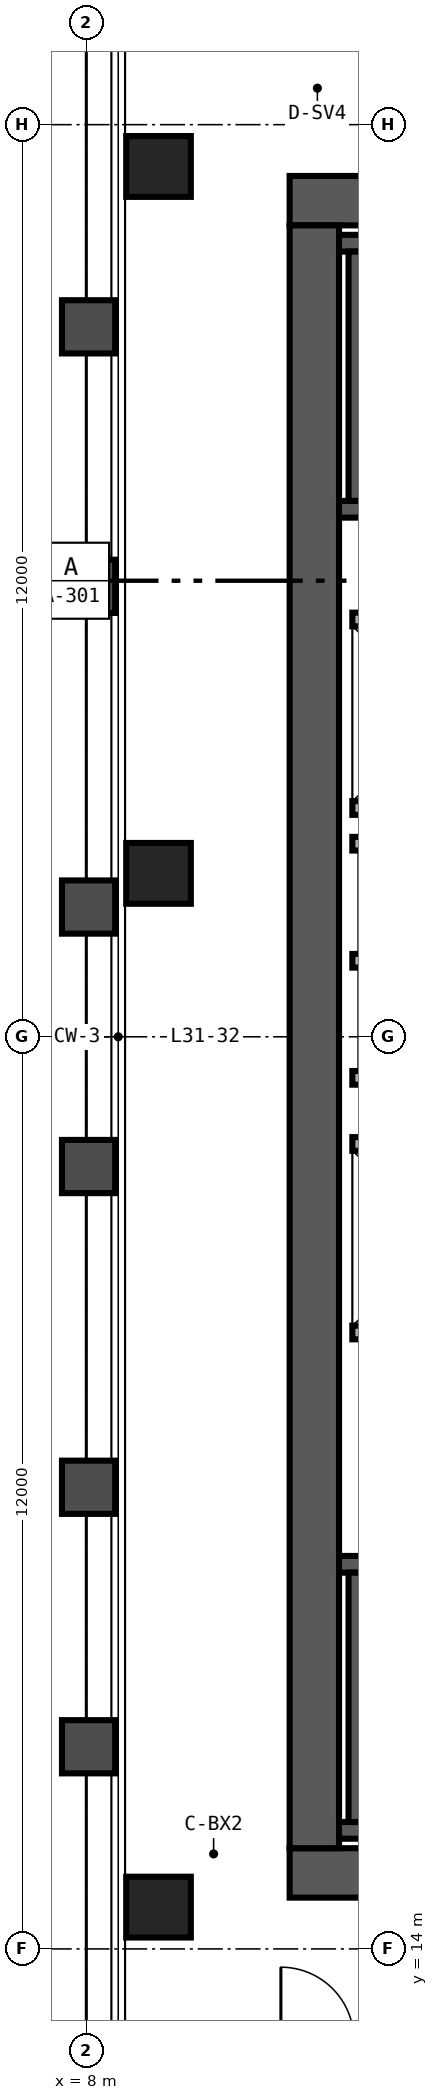
"""IFC4 building model, lengths in metres.
Left out: names, types, materials, properties, quantities, classifications, styles, units other than length and angle.
Written with IfcOpenShell. Run it as: python <this file> out.ifc"""

import sys

from ifc_helpers import new_model, si_unit, direction, frame, frame_2d, origin, origin_2d, place, context, subcontext, project, spatial, rectangle, hollow_rectangle, extrude, source, transform, mapped, element, save


model = new_model("IFC4")
c1 = context("Model", 3, precision=1e-05, world=origin(), true_north=direction((0.0, 1.0)))
c2 = subcontext(c1, "Body", "Model", "MODEL_VIEW")
j1 = project(units=[si_unit("LENGTHUNIT", "METRE"), si_unit("PLANEANGLEUNIT", "RADIAN")], contexts=[c1])
p1 = place(None, origin())
s1 = spatial("IfcSite", under=j1, at=p1, CompositionType="ELEMENT")
p2 = place(p1, origin())
s2 = spatial("IfcBuilding", under=s1, at=p2, CompositionType="ELEMENT")
p3 = place(p2, frame((0.0, 0.0, 126.0)))
s3 = spatial("IfcBuildingStorey", under=s2, at=p3, CompositionType="ELEMENT", Elevation=126.0)
p4 = place(p3, frame((10.675, 15.0, 0.0), z_axis=(0.0, 0.0, 1.0), x_axis=(1.0, 0.0, 0.0)))
e1 = element("IfcWall", 1, at=p4, inside=s3, PredefinedType="SHEAR", context=c2, shape_type="SweptSolid", body=[
    extrude(rectangle(XDim=12.65, YDim=0.65, at=frame_2d((6.325, 0.0))), origin(), (0.0, 0.0, 1.0), 3.36),
])
p5 = place(p4, frame((10.225, 0.0, 0.0)))
e2 = element("IfcOpeningElement", 2, at=p5, cuts=e1, PredefinedType="OPENING", context=c2, shape_type="SweptSolid", body=[
    extrude(rectangle(XDim=1.0, YDim=2.15, at=frame_2d((0.5, 1.075))), frame((0.0, 0.335, 0.0), z_axis=(0.0, -1.0, 0.0), x_axis=(1.0, 0.0, 0.0)), (0.0, 0.0, 1.0), 0.67),
])
p6 = place(p3, frame((10.675, 37.0, 0.0), z_axis=(0.0, 0.0, 1.0), x_axis=(1.0, 0.0, 0.0)))
e3 = element("IfcWall", 3, at=p6, inside=s3, PredefinedType="SHEAR", context=c2, shape_type="SweptSolid", body=[
    extrude(rectangle(XDim=12.65, YDim=0.65, at=frame_2d((6.325, 0.0))), origin(), (0.0, 0.0, 1.0), 3.36),
])
p7 = place(p6, frame((10.425, 0.0, 0.0)))
e4 = element("IfcOpeningElement", 4, at=p7, cuts=e3, PredefinedType="OPENING", context=c2, shape_type="SweptSolid", body=[
    extrude(rectangle(XDim=1.0, YDim=2.15, at=frame_2d((0.5, 1.075))), frame((0.0, 0.335, 0.0), z_axis=(0.0, -1.0, 0.0), x_axis=(1.0, 0.0, 0.0)), (0.0, 0.0, 1.0), 0.67),
])
p8 = place(p3, frame((11.0, 15.325, 0.0), z_axis=(0.0, 0.0, 1.0), x_axis=(0.0, 1.0, 0.0)))
e5 = element("IfcWall", 5, at=p8, inside=s3, PredefinedType="SHEAR", context=c2, shape_type="SweptSolid", body=[
    extrude(rectangle(XDim=21.35, YDim=0.65, at=frame_2d((10.675, 0.0))), origin(), (0.0, 0.0, 1.0), 3.36),
])
p9 = place(p3, frame((11.325, 15.56, 0.0), z_axis=(0.0, 0.0, 1.0), x_axis=(1.0, 0.0, 0.0)))
e6 = element("IfcWall", 6, at=p9, inside=s3, PredefinedType="SHEAR", context=c2, shape_type="SweptSolid", body=[
    extrude(rectangle(XDim=7.985, YDim=0.22, at=frame_2d((3.993, 0.0))), origin(), (0.0, 0.0, 1.0), 3.4),
])
p10 = place(p3, frame((11.325, 19.06, 0.0), z_axis=(0.0, 0.0, 1.0), x_axis=(1.0, 0.0, 0.0)))
e7 = element("IfcWall", 7, at=p10, inside=s3, PredefinedType="SHEAR", context=c2, shape_type="SweptSolid", body=[
    extrude(rectangle(XDim=7.985, YDim=0.22, at=frame_2d((3.993, 0.0))), origin(), (0.0, 0.0, 1.0), 3.4),
])
p11 = place(p10, frame((0.595, 0.0, 0.0)))
e8 = element("IfcOpeningElement", 8, at=p11, cuts=e7, PredefinedType="OPENING", context=c2, shape_type="SweptSolid", body=[
    extrude(rectangle(XDim=1.05, YDim=2.15, at=frame_2d((0.525, 1.075))), frame((0.0, 0.12, 0.0), z_axis=(0.0, -1.0, 0.0), x_axis=(1.0, 0.0, 0.0)), (0.0, 0.0, 1.0), 0.24),
])
p12 = place(p3, frame((11.56, 15.67, 0.0), z_axis=(0.0, 0.0, 1.0), x_axis=(0.0, 1.0, 0.0)))
e9 = element("IfcWall", 9, at=p12, inside=s3, PredefinedType="SHEAR", context=c2, shape_type="SweptSolid", body=[
    extrude(rectangle(XDim=3.28, YDim=0.22, at=frame_2d((1.64, 0.0))), origin(), (0.0, 0.0, 1.0), 3.4),
])
p13 = place(p3, frame((11.325, 32.94, 0.0), z_axis=(0.0, 0.0, 1.0), x_axis=(1.0, 0.0, 0.0)))
e10 = element("IfcWall", 10, at=p13, inside=s3, PredefinedType="SHEAR", context=c2, shape_type="SweptSolid", body=[
    extrude(rectangle(XDim=7.985, YDim=0.22, at=frame_2d((3.993, 0.0))), origin(), (0.0, 0.0, 1.0), 3.4),
])
p14 = place(p13, frame((0.595, 0.0, 0.0)))
e11 = element("IfcOpeningElement", 11, at=p14, cuts=e10, PredefinedType="OPENING", context=c2, shape_type="SweptSolid", body=[
    extrude(rectangle(XDim=1.05, YDim=2.15, at=frame_2d((0.525, 1.075))), frame((0.0, 0.12, 0.0), z_axis=(0.0, -1.0, 0.0), x_axis=(1.0, 0.0, 0.0)), (0.0, 0.0, 1.0), 0.24),
])
p15 = place(p3, frame((11.325, 36.44, 0.0), z_axis=(0.0, 0.0, 1.0), x_axis=(1.0, 0.0, 0.0)))
e12 = element("IfcWall", 12, at=p15, inside=s3, PredefinedType="SHEAR", context=c2, shape_type="SweptSolid", body=[
    extrude(rectangle(XDim=7.985, YDim=0.22, at=frame_2d((3.993, 0.0))), origin(), (0.0, 0.0, 1.0), 3.4),
])
p16 = place(p3, frame((11.56, 33.05, 0.0), z_axis=(0.0, 0.0, 1.0), x_axis=(0.0, 1.0, 0.0)))
e13 = element("IfcWall", 13, at=p16, inside=s3, PredefinedType="SHEAR", context=c2, shape_type="SweptSolid", body=[
    extrude(rectangle(XDim=3.28, YDim=0.22, at=frame_2d((1.64, 0.0))), origin(), (0.0, 0.0, 1.0), 3.4),
])
m1 = source(origin(), c2, "Body", "SweptSolid", [
    extrude(hollow_rectangle(XDim=0.85, YDim=0.8, WallThickness=0.032, at=origin_2d()), origin(), (0.0, 0.0, 1.0), 3.36),
])
for number, where, z_axis, x_axis in (
    (14, (8.95, 14.55, 0.0), (0.0, 0.0, 1.0), (1.0, 0.0, 0.0)),
    (15, (8.95, 28.15, 0.0), (0.0, 0.0, 1.0), (1.0, 0.0, 0.0)),
    (16, (8.95, 37.45, 0.0), (0.0, 0.0, 1.0), (1.0, 0.0, 0.0)),
):
    element("IfcColumn", number, at=place(p3, frame(where, z_axis=z_axis, x_axis=x_axis)), inside=s3, PredefinedType="COLUMN", context=c2, shape_type="MappedRepresentation", body=[
        mapped(m1, transform((0.0, 0.0, 0.0), scale=1.0)),
    ])
for number, where, z_axis, x_axis in (
    (17, (11.5, 22.11, 0.0), (0.0, 0.0, 1.0), (1.0, 0.0, 0.0)),
    (18, (11.5, 24.59, 0.0), (0.0, 0.0, 1.0), (1.0, 0.0, 0.0)),
    (19, (11.5, 29.01, 0.0), (0.0, 0.0, 1.0), (1.0, 0.0, 0.0)),
    (20, (11.5, 31.49, 0.0), (0.0, 0.0, 1.0), (1.0, 0.0, 0.0)),
):
    element("IfcWall", number, at=place(p3, frame(where, z_axis=z_axis, x_axis=x_axis)), inside=s3, PredefinedType="SOLIDWALL", context=c2, shape_type="SweptSolid", body=[
        extrude(rectangle(XDim=2.5, YDim=0.18, at=frame_2d((1.25, 0.0))), origin(), (0.0, 0.0, 1.0), 3.36),
    ])
for number, where, z_axis, x_axis in (
    (21, (11.5, 25.46, 0.0), (0.0, 0.0, 1.0), (1.0, 0.0, 0.0)),
    (22, (11.5, 27.0, 0.0), (0.0, 0.0, 1.0), (1.0, 0.0, 0.0)),
    (23, (11.5, 28.54, 0.0), (0.0, 0.0, 1.0), (1.0, 0.0, 0.0)),
):
    element("IfcWall", number, at=place(p3, frame(where, z_axis=z_axis, x_axis=x_axis)), inside=s3, PredefinedType="SOLIDWALL", context=c2, shape_type="SweptSolid", body=[
        extrude(rectangle(XDim=2.51, YDim=0.18, at=frame_2d((1.255, 0.0))), origin(), (0.0, 0.0, 1.0), 3.36),
    ])
save(model, sys.argv[1])
